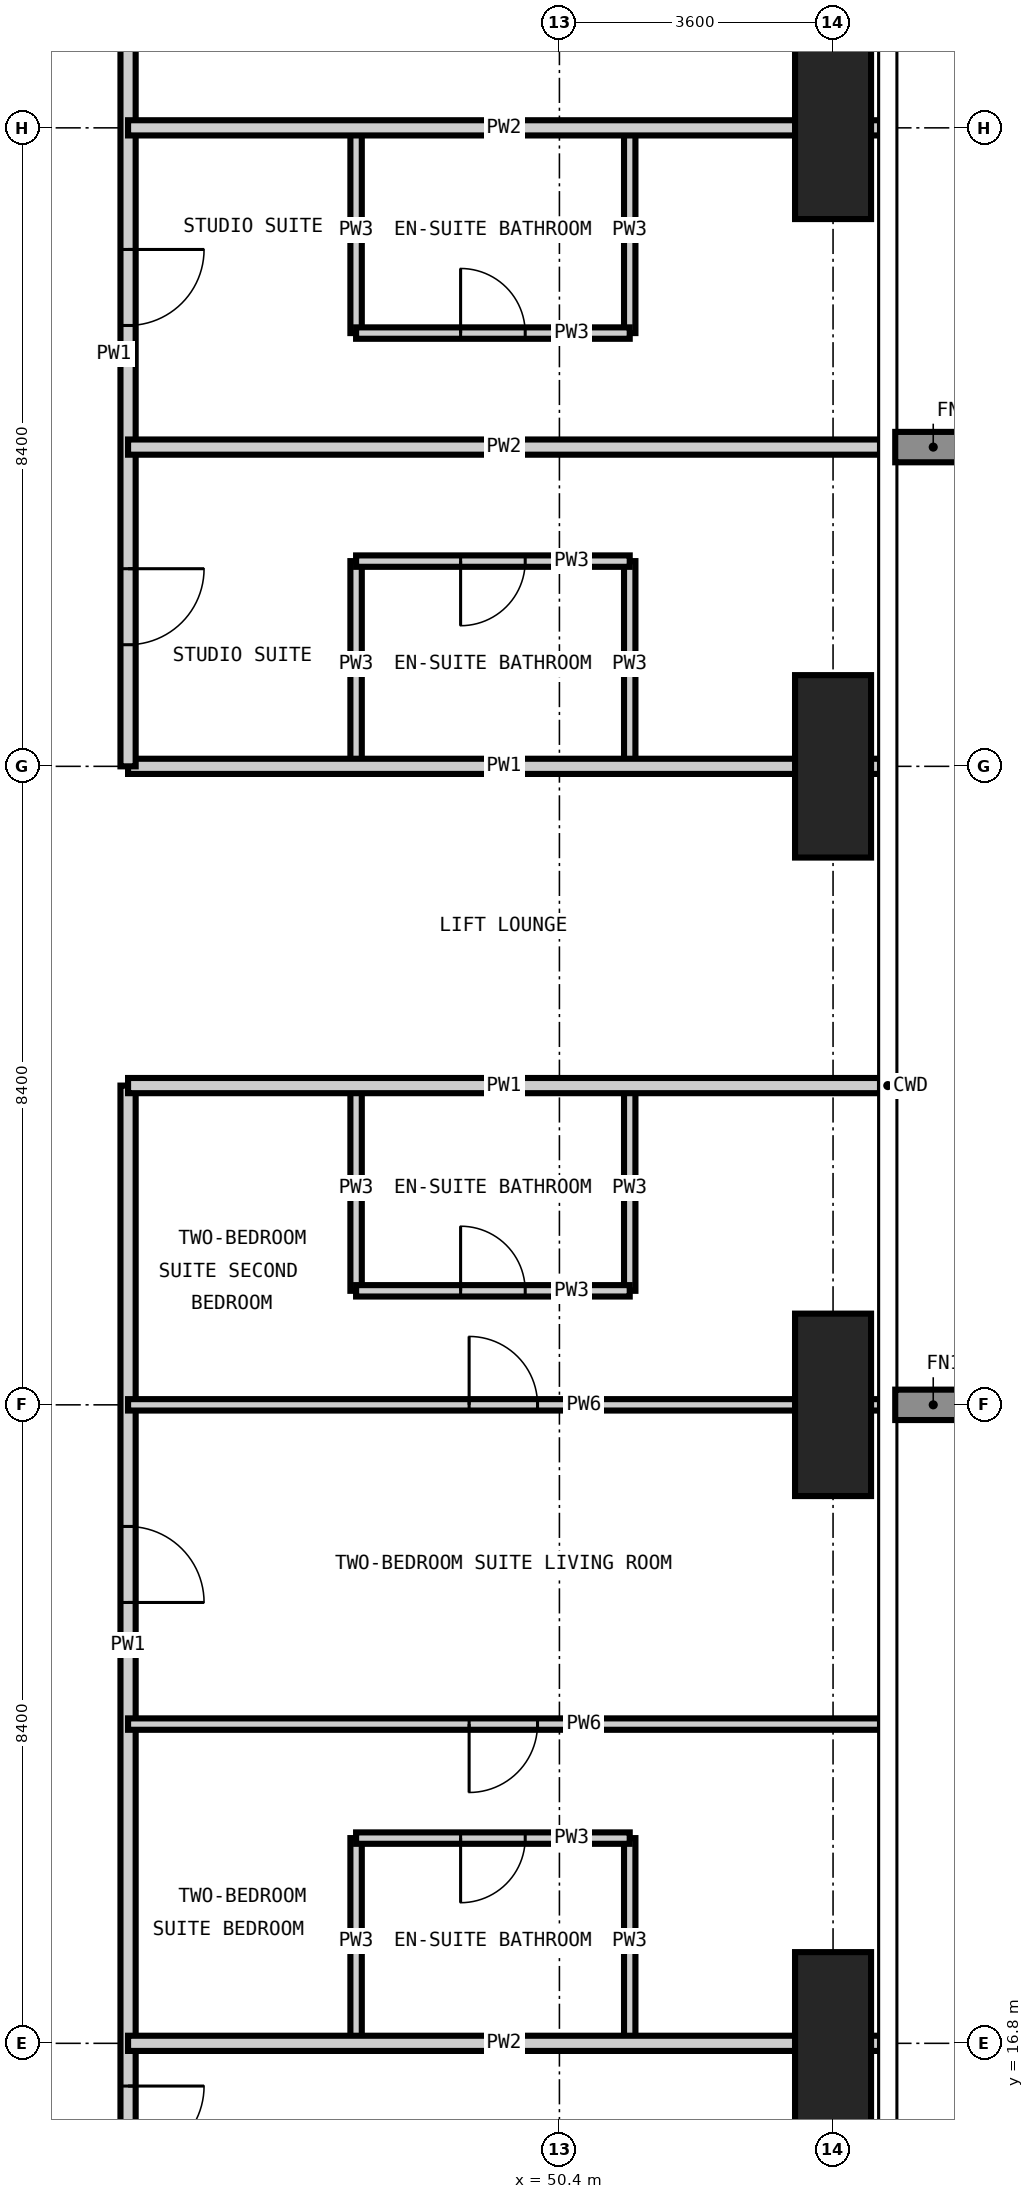
"""IFC4 building model, lengths in metres.
Left out: names, types, materials, properties, quantities, classifications, styles, units other than length and angle.
Written with IfcOpenShell. Run it as: python <this file> out.ifc"""

import sys

from ifc_helpers import new_model, si_unit, direction, frame, frame_2d, origin, origin_2d, place, context, subcontext, project, spatial, rectangle, extrude, element, fill, save


model = new_model("IFC4")
c1 = context("Model", 3, precision=1e-05, world=origin(), true_north=direction((0.0, 1.0)))
c2 = subcontext(c1, "Body", "Model", "MODEL_VIEW")
j1 = project(units=[si_unit("LENGTHUNIT", "METRE"), si_unit("PLANEANGLEUNIT", "RADIAN")], contexts=[c1])
p1 = place(None, origin())
s1 = spatial("IfcSite", under=j1, at=p1, CompositionType="ELEMENT")
p2 = place(p1, origin())
s2 = spatial("IfcBuilding", under=s1, at=p2, CompositionType="ELEMENT")
p3 = place(p2, frame((0.0, 0.0, 252.9)))
s3 = spatial("IfcBuildingStorey", under=s2, at=p3, CompositionType="ELEMENT", Elevation=252.9)
for number, where, z_axis, x_axis in (
    (1, (54.0, 16.8, -0.35), (0.0, 0.0, 1.0), (1.0, 0.0, 0.0)),
    (2, (54.0, 25.2, -0.35), (0.0, 0.0, 1.0), (1.0, 0.0, 0.0)),
    (3, (54.0, 33.6, -0.35), (0.0, 0.0, 1.0), (1.0, 0.0, 0.0)),
    (4, (54.0, 42.0, -0.35), (0.0, 0.0, 1.0), (1.0, 0.0, 0.0)),
):
    element("IfcColumn", number, at=place(p3, frame(where, z_axis=z_axis, x_axis=x_axis)), inside=s3, PredefinedType="COLUMN", context=c2, shape_type="SweptSolid", body=[
        extrude(rectangle(XDim=1.0, YDim=2.4, at=origin_2d()), origin(), (0.0, 0.0, 1.0), 3.9),
    ])
for number, where, z_axis, x_axis in (
    (5, (47.725, 16.8, 0.0), (0.0, 0.0, 1.0), (0.0, 1.0, 0.0)),
    (6, (47.725, 26.7, 0.0), (0.0, 0.0, 1.0), (0.0, 1.0, 0.0)),
    (7, (47.725, 33.6, 0.0), (0.0, 0.0, 1.0), (0.0, 1.0, 0.0)),
    (8, (47.725, 39.3, 0.0), (0.0, 0.0, 1.0), (0.0, 1.0, 0.0)),
    (9, (51.325, 16.8, 0.0), (0.0, 0.0, 1.0), (0.0, 1.0, 0.0)),
    (10, (51.325, 26.7, 0.0), (0.0, 0.0, 1.0), (0.0, 1.0, 0.0)),
    (11, (51.325, 33.6, 0.0), (0.0, 0.0, 1.0), (0.0, 1.0, 0.0)),
    (12, (51.325, 39.3, 0.0), (0.0, 0.0, 1.0), (0.0, 1.0, 0.0)),
):
    element("IfcWall", number, at=place(p3, frame(where, z_axis=z_axis, x_axis=x_axis)), inside=s3, PredefinedType="PARTITIONING", context=c2, shape_type="SweptSolid", body=[
        extrude(rectangle(XDim=2.7, YDim=0.15, at=frame_2d((1.35, 0.0))), origin(), (0.0, 0.0, 1.0), 3.55),
    ])
p4 = place(p3, frame((47.725, 19.5, 0.0), z_axis=(0.0, 0.0, 1.0), x_axis=(1.0, 0.0, 0.0)))
e13 = element("IfcWall", 13, at=p4, inside=s3, PredefinedType="PARTITIONING", context=c2, shape_type="SweptSolid", body=[
    extrude(rectangle(XDim=3.6, YDim=0.15, at=frame_2d((1.8, 0.0))), origin(), (0.0, 0.0, 1.0), 3.55),
])
p5 = place(p4, frame((1.375, 0.0, 0.0)))
e14 = element("IfcOpeningElement", 14, at=p5, cuts=e13, PredefinedType="OPENING", context=c2, shape_type="SweptSolid", body=[
    extrude(rectangle(XDim=0.85, YDim=2.1, at=frame_2d((0.425, 1.05))), frame((0.0, 0.085, 0.0), z_axis=(0.0, -1.0, 0.0), x_axis=(1.0, 0.0, 0.0)), (0.0, 0.0, 1.0), 0.17),
])
p6 = place(p3, frame((47.725, 26.7, 0.0), z_axis=(0.0, 0.0, 1.0), x_axis=(1.0, 0.0, 0.0)))
e15 = element("IfcWall", 15, at=p6, inside=s3, PredefinedType="PARTITIONING", context=c2, shape_type="SweptSolid", body=[
    extrude(rectangle(XDim=3.6, YDim=0.15, at=frame_2d((1.8, 0.0))), origin(), (0.0, 0.0, 1.0), 3.55),
])
p7 = place(p6, frame((1.375, 0.0, 0.0)))
e16 = element("IfcOpeningElement", 16, at=p7, cuts=e15, PredefinedType="OPENING", context=c2, shape_type="SweptSolid", body=[
    extrude(rectangle(XDim=0.85, YDim=2.1, at=frame_2d((0.425, 1.05))), frame((0.0, 0.085, 0.0), z_axis=(0.0, -1.0, 0.0), x_axis=(1.0, 0.0, 0.0)), (0.0, 0.0, 1.0), 0.17),
])
p8 = place(p3, frame((47.725, 36.3, 0.0), z_axis=(0.0, 0.0, 1.0), x_axis=(1.0, 0.0, 0.0)))
e17 = element("IfcWall", 17, at=p8, inside=s3, PredefinedType="PARTITIONING", context=c2, shape_type="SweptSolid", body=[
    extrude(rectangle(XDim=3.6, YDim=0.15, at=frame_2d((1.8, 0.0))), origin(), (0.0, 0.0, 1.0), 3.55),
])
p9 = place(p8, frame((1.375, 0.0, 0.0)))
e18 = element("IfcOpeningElement", 18, at=p9, cuts=e17, PredefinedType="OPENING", context=c2, shape_type="SweptSolid", body=[
    extrude(rectangle(XDim=0.85, YDim=2.1, at=frame_2d((0.425, 1.05))), frame((0.0, 0.085, 0.0), z_axis=(0.0, -1.0, 0.0), x_axis=(1.0, 0.0, 0.0)), (0.0, 0.0, 1.0), 0.17),
])
p10 = place(p3, frame((47.725, 39.3, 0.0), z_axis=(0.0, 0.0, 1.0), x_axis=(1.0, 0.0, 0.0)))
e19 = element("IfcWall", 19, at=p10, inside=s3, PredefinedType="PARTITIONING", context=c2, shape_type="SweptSolid", body=[
    extrude(rectangle(XDim=3.6, YDim=0.15, at=frame_2d((1.8, 0.0))), origin(), (0.0, 0.0, 1.0), 3.55),
])
p11 = place(p10, frame((1.375, 0.0, 0.0)))
e20 = element("IfcOpeningElement", 20, at=p11, cuts=e19, PredefinedType="OPENING", context=c2, shape_type="SweptSolid", body=[
    extrude(rectangle(XDim=0.85, YDim=2.1, at=frame_2d((0.425, 1.05))), frame((0.0, 0.085, 0.0), z_axis=(0.0, -1.0, 0.0), x_axis=(1.0, 0.0, 0.0)), (0.0, 0.0, 1.0), 0.17),
])
p12 = place(p3, frame((44.725, 33.6, 0.0), z_axis=(0.0, 0.0, 1.0), x_axis=(1.0, 0.0, 0.0)))
e21 = element("IfcWall", 21, at=p12, inside=s3, PredefinedType="PARTITIONING", context=c2, shape_type="SweptSolid", body=[
    extrude(rectangle(XDim=9.893, YDim=0.2, at=frame_2d((4.946, 0.0))), origin(), (0.0, 0.0, 1.0), 3.55),
])
p13 = place(p3, frame((44.725, 29.4, 0.0), z_axis=(0.0, 0.0, 1.0), x_axis=(0.0, -1.0, 0.0)))
e22 = element("IfcWall", 22, at=p13, inside=s3, PredefinedType="PARTITIONING", context=c2, shape_type="SweptSolid", body=[
    extrude(rectangle(XDim=14.725, YDim=0.2, at=frame_2d((7.362, 0.0))), origin(), (0.0, 0.0, 1.0), 3.55),
])
p14 = place(p13, frame((5.8, 0.0, 0.0)))
e23 = element("IfcOpeningElement", 23, at=p14, cuts=e22, PredefinedType="OPENING", context=c2, shape_type="SweptSolid", body=[
    extrude(rectangle(XDim=1.0, YDim=2.2, at=frame_2d((0.5, 1.1))), frame((0.0, 0.11, 0.0), z_axis=(0.0, -1.0, 0.0), x_axis=(1.0, 0.0, 0.0)), (0.0, 0.0, 1.0), 0.22),
])
p15 = place(p13, frame((13.162, 0.0, 0.0)))
e24 = element("IfcOpeningElement", 24, at=p15, cuts=e22, PredefinedType="OPENING", context=c2, shape_type="SweptSolid", body=[
    extrude(rectangle(XDim=1.0, YDim=2.2, at=frame_2d((0.5, 1.1))), frame((0.0, 0.11, 0.0), z_axis=(0.0, -1.0, 0.0), x_axis=(1.0, 0.0, 0.0)), (0.0, 0.0, 1.0), 0.22),
])
p16 = place(p3, frame((44.725, 45.325, 0.0), z_axis=(0.0, 0.0, 1.0), x_axis=(0.0, -1.0, 0.0)))
e25 = element("IfcWall", 25, at=p16, inside=s3, PredefinedType="PARTITIONING", context=c2, shape_type="SweptSolid", body=[
    extrude(rectangle(XDim=11.725, YDim=0.2, at=frame_2d((5.862, 0.0))), origin(), (0.0, 0.0, 1.0), 3.55),
])
p17 = place(p16, frame((9.125, 0.0, 0.0)))
e26 = element("IfcOpeningElement", 26, at=p17, cuts=e25, PredefinedType="OPENING", context=c2, shape_type="SweptSolid", body=[
    extrude(rectangle(XDim=1.0, YDim=2.2, at=frame_2d((0.5, 1.1))), frame((0.0, 0.11, 0.0), z_axis=(0.0, -1.0, 0.0), x_axis=(1.0, 0.0, 0.0)), (0.0, 0.0, 1.0), 0.22),
])
p18 = place(p16, frame((4.925, 0.0, 0.0)))
e27 = element("IfcOpeningElement", 27, at=p18, cuts=e25, PredefinedType="OPENING", context=c2, shape_type="SweptSolid", body=[
    extrude(rectangle(XDim=1.0, YDim=2.2, at=frame_2d((0.5, 1.1))), frame((0.0, 0.11, 0.0), z_axis=(0.0, -1.0, 0.0), x_axis=(1.0, 0.0, 0.0)), (0.0, 0.0, 1.0), 0.22),
])
p19 = place(p16, frame((1.162, 0.0, 0.0)))
e28 = element("IfcOpeningElement", 28, at=p19, cuts=e25, PredefinedType="OPENING", context=c2, shape_type="SweptSolid", body=[
    extrude(rectangle(XDim=1.0, YDim=2.2, at=frame_2d((0.5, 1.1))), frame((0.0, 0.11, 0.0), z_axis=(0.0, -1.0, 0.0), x_axis=(1.0, 0.0, 0.0)), (0.0, 0.0, 1.0), 0.22),
])
for number, where, z_axis, x_axis in (
    (29, (54.618, 29.4, 0.0), (0.0, 0.0, 1.0), (-1.0, 0.0, 0.0)),
    (30, (44.725, 16.8, 0.0), (0.0, 0.0, 1.0), (1.0, 0.0, 0.0)),
    (31, (44.725, 37.8, 0.0), (0.0, 0.0, 1.0), (1.0, 0.0, 0.0)),
    (32, (44.725, 42.0, 0.0), (0.0, 0.0, 1.0), (1.0, 0.0, 0.0)),
):
    element("IfcWall", number, at=place(p3, frame(where, z_axis=z_axis, x_axis=x_axis)), inside=s3, PredefinedType="PARTITIONING", context=c2, shape_type="SweptSolid", body=[
        extrude(rectangle(XDim=9.893, YDim=0.2, at=frame_2d((4.946, 0.0))), origin(), (0.0, 0.0, 1.0), 3.55),
    ])
p20 = place(p3, frame((44.725, 21.0, 0.0), z_axis=(0.0, 0.0, 1.0), x_axis=(1.0, 0.0, 0.0)))
e33 = element("IfcWall", 33, at=p20, inside=s3, PredefinedType="PARTITIONING", context=c2, shape_type="SweptSolid", body=[
    extrude(rectangle(XDim=9.893, YDim=0.15, at=frame_2d((4.946, 0.0))), origin(), (0.0, 0.0, 1.0), 3.55),
])
p21 = place(p20, frame((4.487, 0.0, 0.0)))
e34 = element("IfcOpeningElement", 34, at=p21, cuts=e33, PredefinedType="OPENING", context=c2, shape_type="SweptSolid", body=[
    extrude(rectangle(XDim=0.9, YDim=2.1, at=frame_2d((0.45, 1.05))), frame((0.0, 0.085, 0.0), z_axis=(0.0, -1.0, 0.0), x_axis=(1.0, 0.0, 0.0)), (0.0, 0.0, 1.0), 0.17),
])
p22 = place(p3, frame((44.725, 25.2, 0.0), z_axis=(0.0, 0.0, 1.0), x_axis=(1.0, 0.0, 0.0)))
e35 = element("IfcWall", 35, at=p22, inside=s3, PredefinedType="PARTITIONING", context=c2, shape_type="SweptSolid", body=[
    extrude(rectangle(XDim=9.893, YDim=0.15, at=frame_2d((4.946, 0.0))), origin(), (0.0, 0.0, 1.0), 3.55),
])
p23 = place(p22, frame((4.487, 0.0, 0.0)))
e36 = element("IfcOpeningElement", 36, at=p23, cuts=e35, PredefinedType="OPENING", context=c2, shape_type="SweptSolid", body=[
    extrude(rectangle(XDim=0.9, YDim=2.1, at=frame_2d((0.45, 1.05))), frame((0.0, 0.085, 0.0), z_axis=(0.0, -1.0, 0.0), x_axis=(1.0, 0.0, 0.0)), (0.0, 0.0, 1.0), 0.17),
])
p24 = place(p14, origin())
e37 = element("IfcDoor", 37, at=p24, inside=s3, OperationType="SINGLE_SWING_RIGHT", PredefinedType="DOOR", context=c2, shape_type="SweptSolid", body=[
    extrude(rectangle(XDim=1.0, YDim=2.2, at=frame_2d((0.5, 1.1))), frame((0.0, 0.025, 0.0), z_axis=(0.0, -1.0, 0.0), x_axis=(1.0, 0.0, 0.0)), (0.0, 0.0, 1.0), 0.05),
])
fill(e23, e37)
p25 = place(p21, frame((0.9, 0.0, 0.0), z_axis=(0.0, 0.0, 1.0), x_axis=(-1.0, 0.0, 0.0)))
e38 = element("IfcDoor", 38, at=p25, inside=s3, OperationType="SINGLE_SWING_RIGHT", PredefinedType="DOOR", context=c2, shape_type="SweptSolid", body=[
    extrude(rectangle(XDim=0.9, YDim=2.1, at=frame_2d((0.45, 1.05))), frame((0.0, 0.025, 0.0), z_axis=(0.0, -1.0, 0.0), x_axis=(1.0, 0.0, 0.0)), (0.0, 0.0, 1.0), 0.05),
])
fill(e34, e38)
p26 = place(p5, frame((0.85, 0.0, 0.0), z_axis=(0.0, 0.0, 1.0), x_axis=(-1.0, 0.0, 0.0)))
e39 = element("IfcDoor", 39, at=p26, inside=s3, OperationType="SINGLE_SWING_RIGHT", PredefinedType="DOOR", context=c2, shape_type="SweptSolid", body=[
    extrude(rectangle(XDim=0.85, YDim=2.1, at=frame_2d((0.425, 1.05))), frame((0.0, 0.025, 0.0), z_axis=(0.0, -1.0, 0.0), x_axis=(1.0, 0.0, 0.0)), (0.0, 0.0, 1.0), 0.05),
])
fill(e14, e39)
p27 = place(p23, origin())
e40 = element("IfcDoor", 40, at=p27, inside=s3, OperationType="SINGLE_SWING_LEFT", PredefinedType="DOOR", context=c2, shape_type="SweptSolid", body=[
    extrude(rectangle(XDim=0.9, YDim=2.1, at=frame_2d((0.45, 1.05))), frame((0.0, 0.025, 0.0), z_axis=(0.0, -1.0, 0.0), x_axis=(1.0, 0.0, 0.0)), (0.0, 0.0, 1.0), 0.05),
])
fill(e36, e40)
p28 = place(p7, origin())
e41 = element("IfcDoor", 41, at=p28, inside=s3, OperationType="SINGLE_SWING_LEFT", PredefinedType="DOOR", context=c2, shape_type="SweptSolid", body=[
    extrude(rectangle(XDim=0.85, YDim=2.1, at=frame_2d((0.425, 1.05))), frame((0.0, 0.025, 0.0), z_axis=(0.0, -1.0, 0.0), x_axis=(1.0, 0.0, 0.0)), (0.0, 0.0, 1.0), 0.05),
])
fill(e16, e41)
p29 = place(p17, origin())
e42 = element("IfcDoor", 42, at=p29, inside=s3, OperationType="SINGLE_SWING_LEFT", PredefinedType="DOOR", context=c2, shape_type="SweptSolid", body=[
    extrude(rectangle(XDim=1.0, YDim=2.2, at=frame_2d((0.5, 1.1))), frame((0.0, 0.025, 0.0), z_axis=(0.0, -1.0, 0.0), x_axis=(1.0, 0.0, 0.0)), (0.0, 0.0, 1.0), 0.05),
])
fill(e26, e42)
p30 = place(p9, frame((0.85, 0.0, 0.0), z_axis=(0.0, 0.0, 1.0), x_axis=(-1.0, 0.0, 0.0)))
e43 = element("IfcDoor", 43, at=p30, inside=s3, OperationType="SINGLE_SWING_RIGHT", PredefinedType="DOOR", context=c2, shape_type="SweptSolid", body=[
    extrude(rectangle(XDim=0.85, YDim=2.1, at=frame_2d((0.425, 1.05))), frame((0.0, 0.025, 0.0), z_axis=(0.0, -1.0, 0.0), x_axis=(1.0, 0.0, 0.0)), (0.0, 0.0, 1.0), 0.05),
])
fill(e18, e43)
p31 = place(p18, origin())
e44 = element("IfcDoor", 44, at=p31, inside=s3, OperationType="SINGLE_SWING_LEFT", PredefinedType="DOOR", context=c2, shape_type="SweptSolid", body=[
    extrude(rectangle(XDim=1.0, YDim=2.2, at=frame_2d((0.5, 1.1))), frame((0.0, 0.025, 0.0), z_axis=(0.0, -1.0, 0.0), x_axis=(1.0, 0.0, 0.0)), (0.0, 0.0, 1.0), 0.05),
])
fill(e27, e44)
p32 = place(p11, origin())
e45 = element("IfcDoor", 45, at=p32, inside=s3, OperationType="SINGLE_SWING_LEFT", PredefinedType="DOOR", context=c2, shape_type="SweptSolid", body=[
    extrude(rectangle(XDim=0.85, YDim=2.1, at=frame_2d((0.425, 1.05))), frame((0.0, 0.025, 0.0), z_axis=(0.0, -1.0, 0.0), x_axis=(1.0, 0.0, 0.0)), (0.0, 0.0, 1.0), 0.05),
])
fill(e20, e45)
p33 = place(p15, origin())
e46 = element("IfcDoor", 46, at=p33, inside=s3, OperationType="SINGLE_SWING_LEFT", PredefinedType="DOOR", context=c2, shape_type="SweptSolid", body=[
    extrude(rectangle(XDim=1.0, YDim=2.2, at=frame_2d((0.5, 1.1))), frame((0.0, 0.025, 0.0), z_axis=(0.0, -1.0, 0.0), x_axis=(1.0, 0.0, 0.0)), (0.0, 0.0, 1.0), 0.05),
])
fill(e24, e46)
save(model, sys.argv[1])
